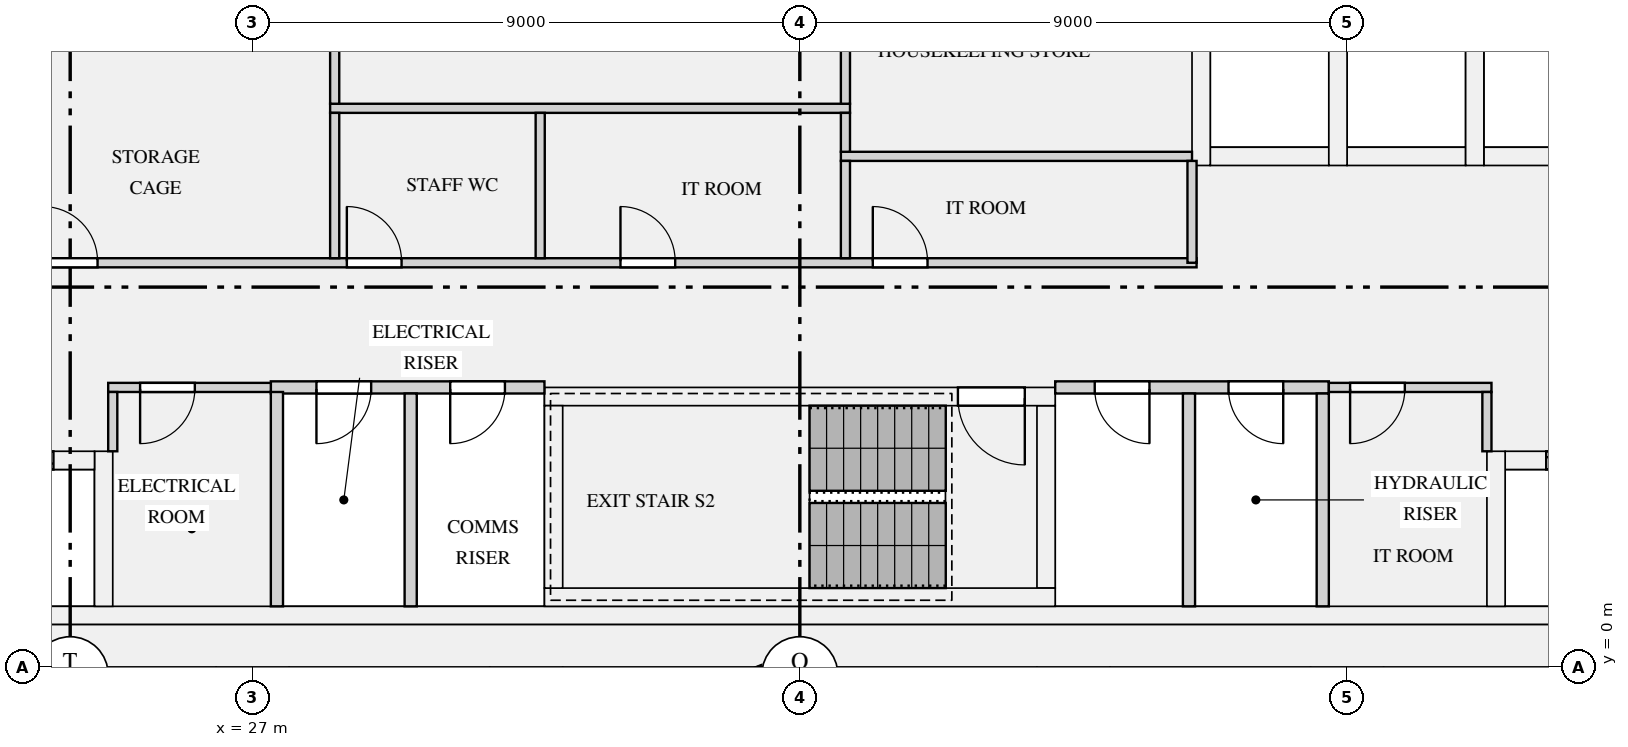
"""IFC4 building model, lengths in metres.
Left out: names, types, materials, properties, quantities, classifications, styles, units other than length and angle.
Written with IfcOpenShell. Run it as: python <this file> out.ifc"""

import sys

from ifc_helpers import new_model, si_unit, direction, frame, frame_2d, origin, place, context, subcontext, project, spatial, rectangle, extrude, element, fill, save


model = new_model("IFC4")
c1 = context("Model", 3, precision=1e-05, world=origin(), true_north=direction((0.0, 1.0)))
c2 = subcontext(c1, "Body", "Model", "MODEL_VIEW")
j1 = project(units=[si_unit("LENGTHUNIT", "METRE"), si_unit("PLANEANGLEUNIT", "RADIAN")], contexts=[c1])
p1 = place(None, origin())
s1 = spatial("IfcSite", under=j1, at=p1, CompositionType="ELEMENT")
p2 = place(p1, origin())
s2 = spatial("IfcBuilding", under=s1, at=p2, CompositionType="ELEMENT")
p3 = place(p2, frame((0.0, 0.0, 172.8)))
s3 = spatial("IfcBuildingStorey", under=s2, at=p3, CompositionType="ELEMENT", Elevation=172.8)
p4 = place(p3, frame((18.7, 0.35, 0.0), z_axis=(0.0, 0.0, 1.0), x_axis=(1.0, 0.0, 0.0)))
e1 = element("IfcWall", 1, at=p4, inside=s3, PredefinedType="SHEAR", context=c2, shape_type="SweptSolid", body=[
    extrude(rectangle(XDim=34.6, YDim=0.7, at=frame_2d((17.3, 0.0))), origin(), (0.0, 0.0, 1.0), 3.15),
])
p5 = place(p3, frame((18.7, 0.85, 0.0), z_axis=(0.0, 0.0, 1.0), x_axis=(1.0, 0.0, 0.0)))
e2 = element("IfcWall", 2, at=p5, inside=s3, PredefinedType="SHEAR", context=c2, shape_type="SweptSolid", body=[
    extrude(rectangle(XDim=34.6, YDim=0.3, at=frame_2d((17.3, 0.0))), origin(), (0.0, 0.0, 1.0), 3.15),
])
p6 = place(p3, frame((42.75, 8.4, 0.0), z_axis=(0.0, 0.0, 1.0), x_axis=(1.0, 0.0, 0.0)))
e3 = element("IfcWall", 3, at=p6, inside=s3, PredefinedType="SHEAR", context=c2, shape_type="SweptSolid", body=[
    extrude(rectangle(XDim=1.95, YDim=0.3, at=frame_2d((0.975, 0.0))), origin(), (0.0, 0.0, 1.0), 3.15),
])
p7 = place(p3, frame((42.6, 8.25, 0.0), z_axis=(0.0, 0.0, 1.0), x_axis=(0.0, 1.0, 0.0)))
e4 = element("IfcWall", 4, at=p7, inside=s3, PredefinedType="SHEAR", context=c2, shape_type="SweptSolid", body=[
    extrude(rectangle(XDim=3.65, YDim=0.3, at=frame_2d((1.825, 0.0))), origin(), (0.0, 0.0, 1.0), 3.15),
])
p8 = place(p3, frame((45.0, 8.4, 0.0), z_axis=(0.0, 0.0, 1.0), x_axis=(1.0, 0.0, 0.0)))
e5 = element("IfcWall", 5, at=p8, inside=s3, PredefinedType="SHEAR", context=c2, shape_type="SweptSolid", body=[
    extrude(rectangle(XDim=1.95, YDim=0.3, at=frame_2d((0.975, 0.0))), origin(), (0.0, 0.0, 1.0), 3.15),
])
p9 = place(p3, frame((44.85, 8.25, 0.0), z_axis=(0.0, 0.0, 1.0), x_axis=(0.0, 1.0, 0.0)))
e6 = element("IfcWall", 6, at=p9, inside=s3, PredefinedType="SHEAR", context=c2, shape_type="SweptSolid", body=[
    extrude(rectangle(XDim=3.65, YDim=0.3, at=frame_2d((1.825, 0.0))), origin(), (0.0, 0.0, 1.0), 3.15),
])
p10 = place(p3, frame((47.25, 8.4, 0.0), z_axis=(0.0, 0.0, 1.0), x_axis=(1.0, 0.0, 0.0)))
e7 = element("IfcWall", 7, at=p10, inside=s3, PredefinedType="SHEAR", context=c2, shape_type="SweptSolid", body=[
    extrude(rectangle(XDim=1.95, YDim=0.3, at=frame_2d((0.975, 0.0))), origin(), (0.0, 0.0, 1.0), 3.15),
])
p11 = place(p3, frame((47.1, 8.25, 0.0), z_axis=(0.0, 0.0, 1.0), x_axis=(0.0, 1.0, 0.0)))
e8 = element("IfcWall", 8, at=p11, inside=s3, PredefinedType="SHEAR", context=c2, shape_type="SweptSolid", body=[
    extrude(rectangle(XDim=3.65, YDim=0.3, at=frame_2d((1.825, 0.0))), origin(), (0.0, 0.0, 1.0), 3.15),
])
p12 = place(p3, frame((21.85, 3.4, 0.0), z_axis=(0.0, 0.0, 1.0), x_axis=(1.0, 0.0, 0.0)))
e9 = element("IfcWall", 9, at=p12, inside=s3, PredefinedType="SHEAR", context=c2, shape_type="SweptSolid", body=[
    extrude(rectangle(XDim=2.55, YDim=0.3, at=frame_2d((1.275, 0.0))), origin(), (0.0, 0.0, 1.0), 3.15),
])
p13 = place(p12, frame((0.675, 0.0, 0.0)))
e10 = element("IfcOpeningElement", 10, at=p13, cuts=e9, PredefinedType="OPENING", context=c2, shape_type="SweptSolid", body=[
    extrude(rectangle(XDim=1.2, YDim=2.1, at=frame_2d((0.6, 1.05))), frame((0.0, 0.16, 0.0), z_axis=(0.0, -1.0, 0.0), x_axis=(1.0, 0.0, 0.0)), (0.0, 0.0, 1.0), 0.32),
])
p14 = place(p3, frame((24.55, 1.0, 0.0), z_axis=(0.0, 0.0, 1.0), x_axis=(0.0, 1.0, 0.0)))
e11 = element("IfcWall", 11, at=p14, inside=s3, PredefinedType="SHEAR", context=c2, shape_type="SweptSolid", body=[
    extrude(rectangle(XDim=2.55, YDim=0.3, at=frame_2d((1.275, 0.0))), origin(), (0.0, 0.0, 1.0), 3.15),
])
p15 = place(p3, frame((47.6, 3.4, 0.0), z_axis=(0.0, 0.0, 1.0), x_axis=(1.0, 0.0, 0.0)))
e12 = element("IfcWall", 12, at=p15, inside=s3, PredefinedType="SHEAR", context=c2, shape_type="SweptSolid", body=[
    extrude(rectangle(XDim=2.55, YDim=0.3, at=frame_2d((1.275, 0.0))), origin(), (0.0, 0.0, 1.0), 3.15),
])
p16 = place(p15, frame((0.675, 0.0, 0.0)))
e13 = element("IfcOpeningElement", 13, at=p16, cuts=e12, PredefinedType="OPENING", context=c2, shape_type="SweptSolid", body=[
    extrude(rectangle(XDim=1.2, YDim=2.1, at=frame_2d((0.6, 1.05))), frame((0.0, 0.16, 0.0), z_axis=(0.0, -1.0, 0.0), x_axis=(1.0, 0.0, 0.0)), (0.0, 0.0, 1.0), 0.32),
])
p17 = place(p3, frame((47.45, 1.0, 0.0), z_axis=(0.0, 0.0, 1.0), x_axis=(0.0, 1.0, 0.0)))
e14 = element("IfcWall", 14, at=p17, inside=s3, PredefinedType="SHEAR", context=c2, shape_type="SweptSolid", body=[
    extrude(rectangle(XDim=2.55, YDim=0.3, at=frame_2d((1.275, 0.0))), origin(), (0.0, 0.0, 1.0), 3.15),
])
p18 = place(p3, frame((31.8, 1.15, 0.0), z_axis=(0.0, 0.0, 1.0), x_axis=(1.0, 0.0, 0.0)))
e15 = element("IfcWall", 15, at=p18, inside=s3, PredefinedType="SHEAR", context=c2, shape_type="SweptSolid", body=[
    extrude(rectangle(XDim=8.4, YDim=0.3, at=frame_2d((4.2, 0.0))), origin(), (0.0, 0.0, 1.0), 3.15),
])
p19 = place(p3, frame((31.8, 4.45, 0.0), z_axis=(0.0, 0.0, 1.0), x_axis=(1.0, 0.0, 0.0)))
e16 = element("IfcWall", 16, at=p19, inside=s3, PredefinedType="SHEAR", context=c2, shape_type="SweptSolid", body=[
    extrude(rectangle(XDim=8.4, YDim=0.3, at=frame_2d((4.2, 0.0))), origin(), (0.0, 0.0, 1.0), 3.15),
])
p20 = place(p19, frame((6.8, 0.0, 0.0)))
e17 = element("IfcOpeningElement", 17, at=p20, cuts=e16, PredefinedType="OPENING", context=c2, shape_type="SweptSolid", body=[
    extrude(rectangle(XDim=1.1, YDim=2.1, at=frame_2d((0.55, 1.05))), frame((0.0, 0.16, 0.0), z_axis=(0.0, -1.0, 0.0), x_axis=(1.0, 0.0, 0.0)), (0.0, 0.0, 1.0), 0.32),
])
for number, where, z_axis, x_axis in (
    (18, (31.95, 1.3, 0.0), (0.0, 0.0, 1.0), (0.0, 1.0, 0.0)),
    (19, (40.05, 1.3, 0.0), (0.0, 0.0, 1.0), (0.0, 1.0, 0.0)),
):
    element("IfcWall", number, at=place(p3, frame(where, z_axis=z_axis, x_axis=x_axis)), inside=s3, PredefinedType="SHEAR", context=c2, shape_type="SweptSolid", body=[
        extrude(rectangle(XDim=3.0, YDim=0.3, at=frame_2d((1.5, 0.0))), origin(), (0.0, 0.0, 1.0), 3.15),
    ])
p21 = place(p3, frame((27.3, 4.6, 0.0), z_axis=(0.0, 0.0, 1.0), x_axis=(1.0, 0.0, 0.0)))
e20 = element("IfcWall", 20, at=p21, inside=s3, PredefinedType="PARTITIONING", context=c2, shape_type="SweptSolid", body=[
    extrude(rectangle(XDim=4.5, YDim=0.2, at=frame_2d((2.25, 0.0))), origin(), (0.0, 0.0, 1.0), 2.83),
])
p22 = place(p21, frame((0.75, 0.0, 0.0)))
e21 = element("IfcOpeningElement", 21, at=p22, cuts=e20, PredefinedType="OPENING", context=c2, shape_type="SweptSolid", body=[
    extrude(rectangle(XDim=0.9, YDim=2.1, at=frame_2d((0.45, 1.05))), frame((0.0, 0.11, 0.0), z_axis=(0.0, -1.0, 0.0), x_axis=(1.0, 0.0, 0.0)), (0.0, 0.0, 1.0), 0.22),
])
p23 = place(p21, frame((2.95, 0.0, 0.0)))
e22 = element("IfcOpeningElement", 22, at=p23, cuts=e20, PredefinedType="OPENING", context=c2, shape_type="SweptSolid", body=[
    extrude(rectangle(XDim=0.9, YDim=2.1, at=frame_2d((0.45, 1.05))), frame((0.0, 0.11, 0.0), z_axis=(0.0, -1.0, 0.0), x_axis=(1.0, 0.0, 0.0)), (0.0, 0.0, 1.0), 0.22),
])
p24 = place(p3, frame((40.2, 4.6, 0.0), z_axis=(0.0, 0.0, 1.0), x_axis=(1.0, 0.0, 0.0)))
e23 = element("IfcWall", 23, at=p24, inside=s3, PredefinedType="PARTITIONING", context=c2, shape_type="SweptSolid", body=[
    extrude(rectangle(XDim=4.5, YDim=0.2, at=frame_2d((2.25, 0.0))), origin(), (0.0, 0.0, 1.0), 2.83),
])
p25 = place(p24, frame((0.65, 0.0, 0.0)))
e24 = element("IfcOpeningElement", 24, at=p25, cuts=e23, PredefinedType="OPENING", context=c2, shape_type="SweptSolid", body=[
    extrude(rectangle(XDim=0.9, YDim=2.1, at=frame_2d((0.45, 1.05))), frame((0.0, 0.11, 0.0), z_axis=(0.0, -1.0, 0.0), x_axis=(1.0, 0.0, 0.0)), (0.0, 0.0, 1.0), 0.22),
])
p26 = place(p24, frame((2.85, 0.0, 0.0)))
e25 = element("IfcOpeningElement", 25, at=p26, cuts=e23, PredefinedType="OPENING", context=c2, shape_type="SweptSolid", body=[
    extrude(rectangle(XDim=0.9, YDim=2.1, at=frame_2d((0.45, 1.05))), frame((0.0, 0.11, 0.0), z_axis=(0.0, -1.0, 0.0), x_axis=(1.0, 0.0, 0.0)), (0.0, 0.0, 1.0), 0.22),
])
p27 = place(p3, frame((24.625, 4.6, 0.0), z_axis=(0.0, 0.0, 1.0), x_axis=(1.0, 0.0, 0.0)))
e26 = element("IfcWall", 26, at=p27, inside=s3, PredefinedType="PARTITIONING", context=c2, shape_type="SweptSolid", body=[
    extrude(rectangle(XDim=2.675, YDim=0.15, at=frame_2d((1.337, 0.0))), origin(), (0.0, 0.0, 1.0), 2.83),
])
p28 = place(p27, frame((0.525, 0.0, 0.0)))
e27 = element("IfcOpeningElement", 27, at=p28, cuts=e26, PredefinedType="OPENING", context=c2, shape_type="SweptSolid", body=[
    extrude(rectangle(XDim=0.9, YDim=2.1, at=frame_2d((0.45, 1.05))), frame((0.0, 0.085, 0.0), z_axis=(0.0, -1.0, 0.0), x_axis=(1.0, 0.0, 0.0)), (0.0, 0.0, 1.0), 0.17),
])
p29 = place(p3, frame((44.7, 4.6, 0.0), z_axis=(0.0, 0.0, 1.0), x_axis=(1.0, 0.0, 0.0)))
e28 = element("IfcWall", 28, at=p29, inside=s3, PredefinedType="PARTITIONING", context=c2, shape_type="SweptSolid", body=[
    extrude(rectangle(XDim=2.675, YDim=0.15, at=frame_2d((1.337, 0.0))), origin(), (0.0, 0.0, 1.0), 2.83),
])
p30 = place(p29, frame((0.35, 0.0, 0.0)))
e29 = element("IfcOpeningElement", 29, at=p30, cuts=e28, PredefinedType="OPENING", context=c2, shape_type="SweptSolid", body=[
    extrude(rectangle(XDim=0.9, YDim=2.1, at=frame_2d((0.45, 1.05))), frame((0.0, 0.085, 0.0), z_axis=(0.0, -1.0, 0.0), x_axis=(1.0, 0.0, 0.0)), (0.0, 0.0, 1.0), 0.17),
])
p31 = place(p3, frame((22.725, 6.65, 0.0), z_axis=(0.0, 0.0, 1.0), x_axis=(1.0, 0.0, 0.0)))
e30 = element("IfcWall", 30, at=p31, inside=s3, PredefinedType="PARTITIONING", context=c2, shape_type="SweptSolid", body=[
    extrude(rectangle(XDim=19.8, YDim=0.15, at=frame_2d((9.9, 0.0))), origin(), (0.0, 0.0, 1.0), 2.83),
])
p32 = place(p31, frame((0.825, 0.0, 0.0)))
e31 = element("IfcOpeningElement", 31, at=p32, cuts=e30, PredefinedType="OPENING", context=c2, shape_type="SweptSolid", body=[
    extrude(rectangle(XDim=0.9, YDim=2.1, at=frame_2d((0.45, 1.05))), frame((0.0, 0.085, 0.0), z_axis=(0.0, -1.0, 0.0), x_axis=(1.0, 0.0, 0.0)), (0.0, 0.0, 1.0), 0.17),
])
p33 = place(p31, frame((5.825, 0.0, 0.0)))
e32 = element("IfcOpeningElement", 32, at=p33, cuts=e30, PredefinedType="OPENING", context=c2, shape_type="SweptSolid", body=[
    extrude(rectangle(XDim=0.9, YDim=2.1, at=frame_2d((0.45, 1.05))), frame((0.0, 0.085, 0.0), z_axis=(0.0, -1.0, 0.0), x_axis=(1.0, 0.0, 0.0)), (0.0, 0.0, 1.0), 0.17),
])
p34 = place(p31, frame((10.325, 0.0, 0.0)))
e33 = element("IfcOpeningElement", 33, at=p34, cuts=e30, PredefinedType="OPENING", context=c2, shape_type="SweptSolid", body=[
    extrude(rectangle(XDim=0.9, YDim=2.1, at=frame_2d((0.45, 1.05))), frame((0.0, 0.085, 0.0), z_axis=(0.0, -1.0, 0.0), x_axis=(1.0, 0.0, 0.0)), (0.0, 0.0, 1.0), 0.17),
])
p35 = place(p31, frame((14.475, 0.0, 0.0)))
e34 = element("IfcOpeningElement", 34, at=p35, cuts=e30, PredefinedType="OPENING", context=c2, shape_type="SweptSolid", body=[
    extrude(rectangle(XDim=0.9, YDim=2.1, at=frame_2d((0.45, 1.05))), frame((0.0, 0.085, 0.0), z_axis=(0.0, -1.0, 0.0), x_axis=(1.0, 0.0, 0.0)), (0.0, 0.0, 1.0), 0.17),
])
p36 = place(p3, frame((36.675, 8.4, 0.0), z_axis=(0.0, 0.0, 1.0), x_axis=(1.0, 0.0, 0.0)))
e35 = element("IfcWall", 35, at=p36, inside=s3, PredefinedType="PARTITIONING", context=c2, shape_type="SweptSolid", body=[
    extrude(rectangle(XDim=5.775, YDim=0.15, at=frame_2d((2.887, 0.0))), origin(), (0.0, 0.0, 1.0), 2.83),
])
p37 = place(p3, frame((28.275, 9.19, 0.0), z_axis=(0.0, 0.0, 1.0), x_axis=(1.0, 0.0, 0.0)))
e36 = element("IfcWall", 36, at=p37, inside=s3, PredefinedType="PARTITIONING", context=c2, shape_type="SweptSolid", body=[
    extrude(rectangle(XDim=8.55, YDim=0.15, at=frame_2d((4.275, 0.0))), origin(), (0.0, 0.0, 1.0), 2.83),
])
p38 = place(p3, frame((27.4, 1.0, 0.0), z_axis=(0.0, 0.0, 1.0), x_axis=(0.0, 1.0, 0.0)))
e37 = element("IfcWall", 37, at=p38, inside=s3, PredefinedType="PARTITIONING", context=c2, shape_type="SweptSolid", body=[
    extrude(rectangle(XDim=3.525, YDim=0.2, at=frame_2d((1.762, 0.0))), origin(), (0.0, 0.0, 1.0), 2.83),
])
for number, where, z_axis, x_axis in (
    (38, (29.6, 1.0, 0.0), (0.0, 0.0, 1.0), (0.0, 1.0, 0.0)),
    (39, (42.4, 1.0, 0.0), (0.0, 0.0, 1.0), (0.0, 1.0, 0.0)),
    (40, (44.6, 1.0, 0.0), (0.0, 0.0, 1.0), (0.0, 1.0, 0.0)),
):
    element("IfcWall", number, at=place(p3, frame(where, z_axis=z_axis, x_axis=x_axis)), inside=s3, PredefinedType="PARTITIONING", context=c2, shape_type="SweptSolid", body=[
        extrude(rectangle(XDim=3.5, YDim=0.2, at=frame_2d((1.75, 0.0))), origin(), (0.0, 0.0, 1.0), 2.83),
    ])
for number, where, z_axis, x_axis in (
    (41, (24.7, 3.55, 0.0), (0.0, 0.0, 1.0), (0.0, 1.0, 0.0)),
    (42, (47.3, 3.55, 0.0), (0.0, 0.0, 1.0), (0.0, 1.0, 0.0)),
):
    element("IfcWall", number, at=place(p3, frame(where, z_axis=z_axis, x_axis=x_axis)), inside=s3, PredefinedType="PARTITIONING", context=c2, shape_type="SweptSolid", body=[
        extrude(rectangle(XDim=0.975, YDim=0.15, at=frame_2d((0.487, 0.0))), origin(), (0.0, 0.0, 1.0), 2.83),
    ])
p39 = place(p3, frame((42.45, 6.65, 0.0), z_axis=(0.0, 0.0, 1.0), x_axis=(0.0, 1.0, 0.0)))
e43 = element("IfcWall", 43, at=p39, inside=s3, PredefinedType="PARTITIONING", context=c2, shape_type="SweptSolid", body=[
    extrude(rectangle(XDim=1.675, YDim=0.15, at=frame_2d((0.837, 0.0))), origin(), (0.0, 0.0, 1.0), 2.83),
])
for number, where, z_axis, x_axis in (
    (44, (28.35, 6.725, 0.0), (0.0, 0.0, 1.0), (0.0, 1.0, 0.0)),
    (45, (31.73, 6.725, 0.0), (0.0, 0.0, 1.0), (0.0, 1.0, 0.0)),
):
    element("IfcWall", number, at=place(p3, frame(where, z_axis=z_axis, x_axis=x_axis)), inside=s3, PredefinedType="PARTITIONING", context=c2, shape_type="SweptSolid", body=[
        extrude(rectangle(XDim=2.39, YDim=0.15, at=frame_2d((1.195, 0.0))), origin(), (0.0, 0.0, 1.0), 2.83),
    ])
p40 = place(p3, frame((36.75, 6.725, 0.0), z_axis=(0.0, 0.0, 1.0), x_axis=(0.0, 1.0, 0.0)))
e46 = element("IfcWall", 46, at=p40, inside=s3, PredefinedType="PARTITIONING", context=c2, shape_type="SweptSolid", body=[
    extrude(rectangle(XDim=1.6, YDim=0.15, at=frame_2d((0.8, 0.0))), origin(), (0.0, 0.0, 1.0), 2.83),
])
p41 = place(p3, frame((36.75, 8.475, 0.0), z_axis=(0.0, 0.0, 1.0), x_axis=(0.0, 1.0, 0.0)))
e47 = element("IfcWall", 47, at=p41, inside=s3, PredefinedType="PARTITIONING", context=c2, shape_type="SweptSolid", body=[
    extrude(rectangle(XDim=0.64, YDim=0.15, at=frame_2d((0.32, 0.0))), origin(), (0.0, 0.0, 1.0), 2.83),
])
for number, where, z_axis, x_axis in (
    (48, (28.35, 9.265, 0.0), (0.0, 0.0, 1.0), (0.0, 1.0, 0.0)),
    (49, (36.75, 9.265, 0.0), (0.0, 0.0, 1.0), (0.0, 1.0, 0.0)),
):
    element("IfcWall", number, at=place(p3, frame(where, z_axis=z_axis, x_axis=x_axis)), inside=s3, PredefinedType="PARTITIONING", context=c2, shape_type="SweptSolid", body=[
        extrude(rectangle(XDim=2.635, YDim=0.15, at=frame_2d((1.317, 0.0))), origin(), (0.0, 0.0, 1.0), 2.83),
    ])
p42 = place(p13, origin())
e50 = element("IfcDoor", 50, at=p42, inside=s3, OperationType="DOUBLE_DOOR_SLIDING", PredefinedType="DOOR", context=c2, shape_type="SweptSolid", body=[
    extrude(rectangle(XDim=1.2, YDim=2.1, at=frame_2d((0.6, 1.05))), frame((0.0, 0.025, 0.0), z_axis=(0.0, -1.0, 0.0), x_axis=(1.0, 0.0, 0.0)), (0.0, 0.0, 1.0), 0.05),
])
fill(e10, e50)
p43 = place(p16, origin())
e51 = element("IfcDoor", 51, at=p43, inside=s3, OperationType="DOUBLE_DOOR_SLIDING", PredefinedType="DOOR", context=c2, shape_type="SweptSolid", body=[
    extrude(rectangle(XDim=1.2, YDim=2.1, at=frame_2d((0.6, 1.05))), frame((0.0, 0.025, 0.0), z_axis=(0.0, -1.0, 0.0), x_axis=(1.0, 0.0, 0.0)), (0.0, 0.0, 1.0), 0.05),
])
fill(e13, e51)
p44 = place(p20, frame((1.1, 0.0, 0.0), z_axis=(0.0, 0.0, 1.0), x_axis=(-1.0, 0.0, 0.0)))
e52 = element("IfcDoor", 52, at=p44, inside=s3, OperationType="SINGLE_SWING_LEFT", PredefinedType="DOOR", context=c2, shape_type="SweptSolid", body=[
    extrude(rectangle(XDim=1.1, YDim=2.1, at=frame_2d((0.55, 1.05))), frame((0.0, 0.025, 0.0), z_axis=(0.0, -1.0, 0.0), x_axis=(1.0, 0.0, 0.0)), (0.0, 0.0, 1.0), 0.05),
])
fill(e17, e52)
p45 = place(p28, frame((0.9, 0.0, 0.0), z_axis=(0.0, 0.0, 1.0), x_axis=(-1.0, 0.0, 0.0)))
e53 = element("IfcDoor", 53, at=p45, inside=s3, OperationType="SINGLE_SWING_RIGHT", PredefinedType="DOOR", context=c2, shape_type="SweptSolid", body=[
    extrude(rectangle(XDim=0.9, YDim=2.1, at=frame_2d((0.45, 1.05))), frame((0.0, 0.025, 0.0), z_axis=(0.0, -1.0, 0.0), x_axis=(1.0, 0.0, 0.0)), (0.0, 0.0, 1.0), 0.05),
])
fill(e27, e53)
p46 = place(p30, frame((0.9, 0.0, 0.0), z_axis=(0.0, 0.0, 1.0), x_axis=(-1.0, 0.0, 0.0)))
e54 = element("IfcDoor", 54, at=p46, inside=s3, OperationType="SINGLE_SWING_RIGHT", PredefinedType="DOOR", context=c2, shape_type="SweptSolid", body=[
    extrude(rectangle(XDim=0.9, YDim=2.1, at=frame_2d((0.45, 1.05))), frame((0.0, 0.025, 0.0), z_axis=(0.0, -1.0, 0.0), x_axis=(1.0, 0.0, 0.0)), (0.0, 0.0, 1.0), 0.05),
])
fill(e29, e54)
p47 = place(p32, origin())
e55 = element("IfcDoor", 55, at=p47, inside=s3, OperationType="SINGLE_SWING_LEFT", PredefinedType="DOOR", context=c2, shape_type="SweptSolid", body=[
    extrude(rectangle(XDim=0.9, YDim=2.1, at=frame_2d((0.45, 1.05))), frame((0.0, 0.025, 0.0), z_axis=(0.0, -1.0, 0.0), x_axis=(1.0, 0.0, 0.0)), (0.0, 0.0, 1.0), 0.05),
])
fill(e31, e55)
p48 = place(p33, origin())
e56 = element("IfcDoor", 56, at=p48, inside=s3, OperationType="SINGLE_SWING_LEFT", PredefinedType="DOOR", context=c2, shape_type="SweptSolid", body=[
    extrude(rectangle(XDim=0.9, YDim=2.1, at=frame_2d((0.45, 1.05))), frame((0.0, 0.025, 0.0), z_axis=(0.0, -1.0, 0.0), x_axis=(1.0, 0.0, 0.0)), (0.0, 0.0, 1.0), 0.05),
])
fill(e32, e56)
p49 = place(p34, origin())
e57 = element("IfcDoor", 57, at=p49, inside=s3, OperationType="SINGLE_SWING_LEFT", PredefinedType="DOOR", context=c2, shape_type="SweptSolid", body=[
    extrude(rectangle(XDim=0.9, YDim=2.1, at=frame_2d((0.45, 1.05))), frame((0.0, 0.025, 0.0), z_axis=(0.0, -1.0, 0.0), x_axis=(1.0, 0.0, 0.0)), (0.0, 0.0, 1.0), 0.05),
])
fill(e33, e57)
p50 = place(p35, origin())
e58 = element("IfcDoor", 58, at=p50, inside=s3, OperationType="SINGLE_SWING_LEFT", PredefinedType="DOOR", context=c2, shape_type="SweptSolid", body=[
    extrude(rectangle(XDim=0.9, YDim=2.1, at=frame_2d((0.45, 1.05))), frame((0.0, 0.025, 0.0), z_axis=(0.0, -1.0, 0.0), x_axis=(1.0, 0.0, 0.0)), (0.0, 0.0, 1.0), 0.05),
])
fill(e34, e58)
p51 = place(p22, frame((0.9, 0.0, 0.0), z_axis=(0.0, 0.0, 1.0), x_axis=(-1.0, 0.0, 0.0)))
e59 = element("IfcDoor", 59, at=p51, inside=s3, OperationType="SINGLE_SWING_RIGHT", PredefinedType="DOOR", context=c2, shape_type="SweptSolid", body=[
    extrude(rectangle(XDim=0.9, YDim=2.1, at=frame_2d((0.45, 1.05))), frame((0.0, 0.025, 0.0), z_axis=(0.0, -1.0, 0.0), x_axis=(1.0, 0.0, 0.0)), (0.0, 0.0, 1.0), 0.05),
])
fill(e21, e59)
p52 = place(p23, frame((0.9, 0.0, 0.0), z_axis=(0.0, 0.0, 1.0), x_axis=(-1.0, 0.0, 0.0)))
e60 = element("IfcDoor", 60, at=p52, inside=s3, OperationType="SINGLE_SWING_RIGHT", PredefinedType="DOOR", context=c2, shape_type="SweptSolid", body=[
    extrude(rectangle(XDim=0.9, YDim=2.1, at=frame_2d((0.45, 1.05))), frame((0.0, 0.025, 0.0), z_axis=(0.0, -1.0, 0.0), x_axis=(1.0, 0.0, 0.0)), (0.0, 0.0, 1.0), 0.05),
])
fill(e22, e60)
p53 = place(p25, frame((0.9, 0.0, 0.0), z_axis=(0.0, 0.0, 1.0), x_axis=(-1.0, 0.0, 0.0)))
e61 = element("IfcDoor", 61, at=p53, inside=s3, OperationType="SINGLE_SWING_LEFT", PredefinedType="DOOR", context=c2, shape_type="SweptSolid", body=[
    extrude(rectangle(XDim=0.9, YDim=2.1, at=frame_2d((0.45, 1.05))), frame((0.0, 0.025, 0.0), z_axis=(0.0, -1.0, 0.0), x_axis=(1.0, 0.0, 0.0)), (0.0, 0.0, 1.0), 0.05),
])
fill(e24, e61)
p54 = place(p26, frame((0.9, 0.0, 0.0), z_axis=(0.0, 0.0, 1.0), x_axis=(-1.0, 0.0, 0.0)))
e62 = element("IfcDoor", 62, at=p54, inside=s3, OperationType="SINGLE_SWING_LEFT", PredefinedType="DOOR", context=c2, shape_type="SweptSolid", body=[
    extrude(rectangle(XDim=0.9, YDim=2.1, at=frame_2d((0.45, 1.05))), frame((0.0, 0.025, 0.0), z_axis=(0.0, -1.0, 0.0), x_axis=(1.0, 0.0, 0.0)), (0.0, 0.0, 1.0), 0.05),
])
fill(e25, e62)
save(model, sys.argv[1])
